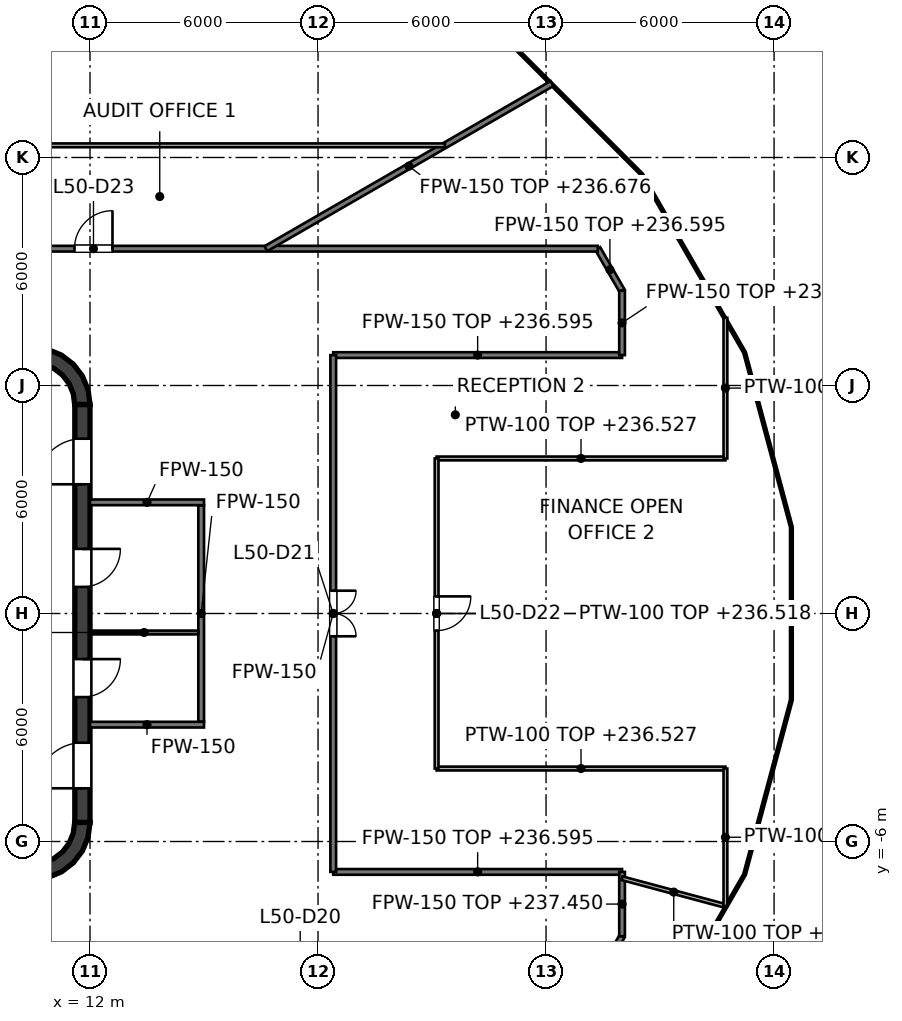
"""IFC4 building model, lengths in metres.
Left out: names, types, materials, properties, quantities, classifications, styles, units other than length and angle.
Written with IfcOpenShell. Run it as: python <this file> out.ifc"""

import sys

from ifc_helpers import new_model, si_unit, direction, frame, frame_2d, origin, place, context, subcontext, project, spatial, polyline, rectangle, outline, extrude, element, fill, save


model = new_model("IFC4")
c1 = context("Model", 3, precision=1e-05, world=origin(), true_north=direction((0.0, 1.0)))
c2 = subcontext(c1, "Body", "Model", "MODEL_VIEW")
j1 = project(units=[si_unit("LENGTHUNIT", "METRE"), si_unit("PLANEANGLEUNIT", "RADIAN")], contexts=[c1])
p1 = place(None, origin())
s1 = spatial("IfcSite", under=j1, at=p1, CompositionType="ELEMENT")
p2 = place(p1, origin())
s2 = spatial("IfcBuilding", under=s1, at=p2, CompositionType="ELEMENT")
p3 = place(p2, frame((0.0, 0.0, 233.6)))
s3 = spatial("IfcBuildingStorey", under=s2, at=p3, CompositionType="ELEMENT", Elevation=233.6)
p4 = place(p3, frame((11.8, -5.5, 0.0), z_axis=(0.0, 0.0, 1.0), x_axis=(0.0, 1.0, 0.0)))
e1 = element("IfcWall", 1, at=p4, inside=s3, PredefinedType="SHEAR", context=c2, shape_type="SweptSolid", body=[
    extrude(rectangle(XDim=11.0, YDim=0.4, at=frame_2d((5.5, 0.0))), origin(), (0.0, 0.0, 1.0), 4.0),
])
p5 = place(p4, frame((3.3, 0.0, 0.0)))
e2 = element("IfcOpeningElement", 2, at=p5, cuts=e1, PredefinedType="OPENING", context=c2, shape_type="SweptSolid", body=[
    extrude(rectangle(XDim=1.0, YDim=2.1, at=frame_2d((0.5, 1.05))), frame((0.0, 0.2, 0.0), z_axis=(0.0, -1.0, 0.0), x_axis=(1.0, 0.0, 0.0)), (0.0, 0.0, 1.0), 0.4),
])
p6 = place(p4, frame((6.2, 0.0, 0.0)))
e3 = element("IfcOpeningElement", 3, at=p6, cuts=e1, PredefinedType="OPENING", context=c2, shape_type="SweptSolid", body=[
    extrude(rectangle(XDim=1.0, YDim=2.1, at=frame_2d((0.5, 1.05))), frame((0.0, 0.2, 0.0), z_axis=(0.0, -1.0, 0.0), x_axis=(1.0, 0.0, 0.0)), (0.0, 0.0, 1.0), 0.4),
])
p7 = place(p4, frame((0.9, 0.0, 0.0)))
e4 = element("IfcOpeningElement", 4, at=p7, cuts=e1, PredefinedType="OPENING", context=c2, shape_type="SweptSolid", body=[
    extrude(rectangle(XDim=1.2, YDim=2.1, at=frame_2d((0.6, 1.05))), frame((0.0, 0.2, 0.0), z_axis=(0.0, -1.0, 0.0), x_axis=(1.0, 0.0, 0.0)), (0.0, 0.0, 1.0), 0.4),
])
p8 = place(p4, frame((8.9, 0.0, 0.0)))
e5 = element("IfcOpeningElement", 5, at=p8, cuts=e1, PredefinedType="OPENING", context=c2, shape_type="SweptSolid", body=[
    extrude(rectangle(XDim=1.2, YDim=2.1, at=frame_2d((0.6, 1.05))), frame((0.0, 0.2, 0.0), z_axis=(0.0, -1.0, 0.0), x_axis=(1.0, 0.0, 0.0)), (0.0, 0.0, 1.0), 0.4),
])
p9 = place(p3, origin())
e6 = element("IfcWall", 6, at=p9, inside=s3, PredefinedType="SHEAR", context=c2, shape_type="SweptSolid", body=[
    extrude(outline(polyline([(10.5, 7.0), (10.5, 6.596), (10.784, 6.559), (11.048, 6.45), (11.275, 6.275), (11.45, 6.048), (11.559, 5.784), (11.596, 5.5), (12.0, 5.5), (11.949, 5.888), (11.799, 6.25), (11.561, 6.561), (11.25, 6.799), (10.888, 6.949), (10.5, 7.0)])), origin(), (0.0, 0.0, 1.0), 4.0),
])
e7 = element("IfcWall", 7, at=p9, inside=s3, PredefinedType="SHEAR", context=c2, shape_type="SweptSolid", body=[
    extrude(outline(polyline([(12.0, -5.5), (11.596, -5.5), (11.559, -5.784), (11.45, -6.048), (11.275, -6.275), (11.048, -6.45), (10.784, -6.559), (10.5, -6.596), (10.5, -7.0), (10.888, -6.949), (11.25, -6.799), (11.561, -6.561), (11.799, -6.25), (11.949, -5.888), (12.0, -5.5)])), origin(), (0.0, 0.0, 1.0), 4.0),
])
p10 = place(p3, frame((14.925, -2.85, 0.0), z_axis=(0.0, 0.0, 1.0), x_axis=(0.0, 1.0, 0.0)))
e8 = element("IfcWall", 8, at=p10, inside=s3, PredefinedType="PARTITIONING", context=c2, shape_type="SweptSolid", body=[
    extrude(rectangle(XDim=5.7, YDim=0.15, at=frame_2d((2.85, 0.0))), origin(), (0.0, 0.0, 1.0), 2.918),
])
for number, where, z_axis, x_axis in (
    (9, (12.0, 2.925, 0.0), (0.0, 0.0, 1.0), (1.0, 0.0, 0.0)),
    (10, (12.0, -2.925, 0.0), (0.0, 0.0, 1.0), (1.0, 0.0, 0.0)),
):
    element("IfcWall", number, at=place(p3, frame(where, z_axis=z_axis, x_axis=x_axis)), inside=s3, PredefinedType="PARTITIONING", context=c2, shape_type="SweptSolid", body=[
        extrude(rectangle(XDim=3.0, YDim=0.15, at=frame_2d((1.5, 0.0))), origin(), (0.0, 0.0, 1.0), 2.918),
    ])
p11 = place(p3, frame((12.0, -0.5, 0.0), z_axis=(0.0, 0.0, 1.0), x_axis=(1.0, 0.0, 0.0)))
e11 = element("IfcWall", 11, at=p11, inside=s3, PredefinedType="PARTITIONING", context=c2, shape_type="SweptSolid", body=[
    extrude(rectangle(XDim=2.85, YDim=0.1, at=frame_2d((1.425, 0.0))), origin(), (0.0, 0.0, 1.0), 3.85),
])
p12 = place(p3, frame((25.361, 9.6, 0.0), z_axis=(0.0, 0.0, 1.0), x_axis=(0.499816142895, -0.866131527715, 0.0)))
e12 = element("IfcWall", 12, at=p12, inside=s3, PredefinedType="PARTITIONING", context=c2, shape_type="SweptSolid", body=[
    extrude(rectangle(XDim=1.278, YDim=0.15, at=frame_2d((0.639, 0.0))), origin(), (0.0, 0.0, 1.0), 2.995),
])
for number, where, z_axis, x_axis in (
    (13, (18.4, -6.8, 0.0), (0.0, 0.0, 1.0), (1.0, 0.0, 0.0)),
    (14, (18.4, 6.8, 0.0), (0.0, 0.0, 1.0), (1.0, 0.0, 0.0)),
):
    element("IfcWall", number, at=place(p3, frame(where, z_axis=z_axis, x_axis=x_axis)), inside=s3, PredefinedType="PARTITIONING", context=c2, shape_type="SweptSolid", body=[
        extrude(rectangle(XDim=7.6, YDim=0.15, at=frame_2d((3.8, 0.0))), origin(), (0.0, 0.0, 1.0), 2.995),
    ])
p13 = place(p3, frame((-25.36, 9.6, 0.0), z_axis=(0.0, 0.0, 1.0), x_axis=(1.0, 0.0, 0.0)))
e15 = element("IfcWall", 15, at=p13, inside=s3, PredefinedType="PARTITIONING", context=c2, shape_type="SweptSolid", body=[
    extrude(rectangle(XDim=50.721, YDim=0.15, at=frame_2d((25.361, 0.0))), origin(), (0.0, 0.0, 1.0), 2.927),
])
p14 = place(p13, frame((36.951, 0.0, 0.0)))
e16 = element("IfcOpeningElement", 16, at=p14, cuts=e15, PredefinedType="OPENING", context=c2, shape_type="SweptSolid", body=[
    extrude(rectangle(XDim=1.0, YDim=2.1, at=frame_2d((0.5, 1.05))), frame((0.0, 0.075, 0.0), z_axis=(0.0, -1.0, 0.0), x_axis=(1.0, 0.0, 0.0)), (0.0, 0.0, 1.0), 0.15),
])
p15 = place(p13, frame((30.168, 0.0, 0.0)))
e17 = element("IfcOpeningElement", 17, at=p15, cuts=e15, PredefinedType="OPENING", context=c2, shape_type="SweptSolid", body=[
    extrude(rectangle(XDim=1.0, YDim=2.1, at=frame_2d((0.5, 1.05))), frame((0.0, 0.075, 0.0), z_axis=(0.0, -1.0, 0.0), x_axis=(1.0, 0.0, 0.0)), (0.0, 0.0, 1.0), 0.15),
])
p16 = place(p13, frame((25.004, 0.0, 0.0)))
e18 = element("IfcOpeningElement", 18, at=p16, cuts=e15, PredefinedType="OPENING", context=c2, shape_type="SweptSolid", body=[
    extrude(rectangle(XDim=1.0, YDim=2.1, at=frame_2d((0.5, 1.05))), frame((0.0, 0.075, 0.0), z_axis=(0.0, -1.0, 0.0), x_axis=(1.0, 0.0, 0.0)), (0.0, 0.0, 1.0), 0.15),
])
p17 = place(p13, frame((18.774, 0.0, 0.0)))
e19 = element("IfcOpeningElement", 19, at=p17, cuts=e15, PredefinedType="OPENING", context=c2, shape_type="SweptSolid", body=[
    extrude(rectangle(XDim=1.0, YDim=2.1, at=frame_2d((0.5, 1.05))), frame((0.0, 0.075, 0.0), z_axis=(0.0, -1.0, 0.0), x_axis=(1.0, 0.0, 0.0)), (0.0, 0.0, 1.0), 0.15),
])
p18 = place(p13, frame((7.23, 0.0, 0.0)))
e20 = element("IfcOpeningElement", 20, at=p18, cuts=e15, PredefinedType="OPENING", context=c2, shape_type="SweptSolid", body=[
    extrude(rectangle(XDim=1.2, YDim=2.1, at=frame_2d((0.6, 1.05))), frame((0.0, 0.075, 0.0), z_axis=(0.0, -1.0, 0.0), x_axis=(1.0, 0.0, 0.0)), (0.0, 0.0, 1.0), 0.15),
])
p19 = place(p3, frame((16.628, 9.6, 0.0), z_axis=(0.0, 0.0, 1.0), x_axis=(0.866056969008, 0.499945323442, 0.0)))
e21 = element("IfcWall", 21, at=p19, inside=s3, PredefinedType="PARTITIONING", context=c2, shape_type="SweptSolid", body=[
    extrude(rectangle(XDim=8.692, YDim=0.15, at=frame_2d((4.346, 0.0))), origin(), (0.0, 0.0, 1.0), 3.076),
])
p20 = place(p3, frame((25.361, -9.6, 0.0), z_axis=(0.0, 0.0, 1.0), x_axis=(0.499816142895, 0.866131527715, 0.0)))
e22 = element("IfcWall", 22, at=p20, inside=s3, PredefinedType="PARTITIONING", context=c2, shape_type="SweptSolid", body=[
    extrude(rectangle(XDim=1.278, YDim=0.15, at=frame_2d((0.639, 0.0))), origin(), (0.0, 0.0, 1.0), 2.995),
])
for number, where, z_axis, x_axis in (
    (23, (26.0, -8.493, 0.0), (0.0, 0.0, 1.0), (0.0, 1.0, 0.0)),
    (24, (26.0, 6.8, 0.0), (0.0, 0.0, 1.0), (0.0, 1.0, 0.0)),
):
    element("IfcWall", number, at=place(p3, frame(where, z_axis=z_axis, x_axis=x_axis)), inside=s3, PredefinedType="PARTITIONING", context=c2, shape_type="SweptSolid", body=[
        extrude(rectangle(XDim=1.693, YDim=0.15, at=frame_2d((0.846, 0.0))), origin(), (0.0, 0.0, 1.0), 3.85),
    ])
p21 = place(p3, frame((18.4, -6.8, 0.0), z_axis=(0.0, 0.0, 1.0), x_axis=(0.0, 1.0, 0.0)))
e25 = element("IfcWall", 25, at=p21, inside=s3, PredefinedType="PARTITIONING", context=c2, shape_type="SweptSolid", body=[
    extrude(rectangle(XDim=13.6, YDim=0.15, at=frame_2d((6.8, 0.0))), origin(), (0.0, 0.0, 1.0), 2.918),
])
p22 = place(p21, frame((6.2, 0.0, 0.0)))
e26 = element("IfcOpeningElement", 26, at=p22, cuts=e25, PredefinedType="OPENING", context=c2, shape_type="SweptSolid", body=[
    extrude(rectangle(XDim=1.2, YDim=2.1, at=frame_2d((0.6, 1.05))), frame((0.0, 0.075, 0.0), z_axis=(0.0, -1.0, 0.0), x_axis=(1.0, 0.0, 0.0)), (0.0, 0.0, 1.0), 0.15),
])
p23 = place(p3, frame((26.0, -6.967, 0.0), z_axis=(0.0, 0.0, 1.0), x_axis=(0.965908960342, -0.258881981472, 0.0)))
e27 = element("IfcWall", 27, at=p23, inside=s3, PredefinedType="PARTITIONING", context=c2, shape_type="SweptSolid", body=[
    extrude(rectangle(XDim=2.816, YDim=0.1, at=frame_2d((1.408, 0.0))), origin(), (0.0, 0.0, 1.0), 3.527),
])
for number, where, z_axis, x_axis in (
    (28, (21.12, -4.08, 0.0), (0.0, 0.0, 1.0), (1.0, 0.0, 0.0)),
    (29, (21.12, 4.08, 0.0), (0.0, 0.0, 1.0), (1.0, 0.0, 0.0)),
):
    element("IfcWall", number, at=place(p3, frame(where, z_axis=z_axis, x_axis=x_axis)), inside=s3, PredefinedType="PARTITIONING", context=c2, shape_type="SweptSolid", body=[
        extrude(rectangle(XDim=7.6, YDim=0.1, at=frame_2d((3.8, 0.0))), origin(), (0.0, 0.0, 1.0), 2.927),
    ])
p24 = place(p3, frame((-25.781, 12.32, 0.0), z_axis=(0.0, 0.0, 1.0), x_axis=(1.0, 0.0, 0.0)))
e30 = element("IfcWall", 30, at=p24, inside=s3, PredefinedType="PARTITIONING", context=c2, shape_type="SweptSolid", body=[
    extrude(rectangle(XDim=47.12, YDim=0.1, at=frame_2d((23.56, 0.0))), origin(), (0.0, 0.0, 1.0), 2.927),
])
p25 = place(p24, frame((25.081, 0.0, 0.0)))
e31 = element("IfcOpeningElement", 31, at=p25, cuts=e30, PredefinedType="OPENING", context=c2, shape_type="SweptSolid", body=[
    extrude(rectangle(XDim=1.8, YDim=2.1, at=frame_2d((0.9, 1.05))), frame((0.0, 0.05, 0.0), z_axis=(0.0, -1.0, 0.0), x_axis=(1.0, 0.0, 0.0)), (0.0, 0.0, 1.0), 0.1),
])
p26 = place(p24, frame((5.831, 0.0, 0.0)))
e32 = element("IfcOpeningElement", 32, at=p26, cuts=e30, PredefinedType="OPENING", context=c2, shape_type="SweptSolid", body=[
    extrude(rectangle(XDim=1.8, YDim=2.1, at=frame_2d((0.9, 1.05))), frame((0.0, 0.05, 0.0), z_axis=(0.0, -1.0, 0.0), x_axis=(1.0, 0.0, 0.0)), (0.0, 0.0, 1.0), 0.1),
])
p27 = place(p3, frame((28.72, -7.696, 0.0), z_axis=(0.0, 0.0, 1.0), x_axis=(0.0, 1.0, 0.0)))
e33 = element("IfcWall", 33, at=p27, inside=s3, PredefinedType="PARTITIONING", context=c2, shape_type="SweptSolid", body=[
    extrude(rectangle(XDim=3.616, YDim=0.1, at=frame_2d((1.808, 0.0))), origin(), (0.0, 0.0, 1.0), 2.918),
])
p28 = place(p3, frame((28.72, 4.08, 0.0), z_axis=(0.0, 0.0, 1.0), x_axis=(0.0, 1.0, 0.0)))
e34 = element("IfcWall", 34, at=p28, inside=s3, PredefinedType="PARTITIONING", context=c2, shape_type="SweptSolid", body=[
    extrude(rectangle(XDim=3.702, YDim=0.1, at=frame_2d((1.851, 0.0))), origin(), (0.0, 0.0, 1.0), 2.918),
])
p29 = place(p3, frame((21.12, -4.08, 0.0), z_axis=(0.0, 0.0, 1.0), x_axis=(0.0, 1.0, 0.0)))
e35 = element("IfcWall", 35, at=p29, inside=s3, PredefinedType="PARTITIONING", context=c2, shape_type="SweptSolid", body=[
    extrude(rectangle(XDim=8.16, YDim=0.1, at=frame_2d((4.08, 0.0))), origin(), (0.0, 0.0, 1.0), 2.918),
])
p30 = place(p29, frame((3.63, 0.0, 0.0)))
e36 = element("IfcOpeningElement", 36, at=p30, cuts=e35, PredefinedType="OPENING", context=c2, shape_type="SweptSolid", body=[
    extrude(rectangle(XDim=0.9, YDim=2.1, at=frame_2d((0.45, 1.05))), frame((0.0, 0.05, 0.0), z_axis=(0.0, -1.0, 0.0), x_axis=(1.0, 0.0, 0.0)), (0.0, 0.0, 1.0), 0.1),
])
p31 = place(p5, origin())
e37 = element("IfcDoor", 37, at=p31, inside=s3, OperationType="SINGLE_SWING_RIGHT", PredefinedType="DOOR", context=c2, shape_type="SweptSolid", body=[
    extrude(rectangle(XDim=1.0, YDim=2.1, at=frame_2d((0.5, 1.05))), frame((0.0, 0.025, 0.0), z_axis=(0.0, -1.0, 0.0), x_axis=(1.0, 0.0, 0.0)), (0.0, 0.0, 1.0), 0.05),
])
fill(e2, e37)
p32 = place(p6, origin())
e38 = element("IfcDoor", 38, at=p32, inside=s3, OperationType="SINGLE_SWING_RIGHT", PredefinedType="DOOR", context=c2, shape_type="SweptSolid", body=[
    extrude(rectangle(XDim=1.0, YDim=2.1, at=frame_2d((0.5, 1.05))), frame((0.0, 0.025, 0.0), z_axis=(0.0, -1.0, 0.0), x_axis=(1.0, 0.0, 0.0)), (0.0, 0.0, 1.0), 0.05),
])
fill(e3, e38)
p33 = place(p7, origin())
e39 = element("IfcDoor", 39, at=p33, inside=s3, OperationType="SINGLE_SWING_LEFT", PredefinedType="DOOR", context=c2, shape_type="SweptSolid", body=[
    extrude(rectangle(XDim=1.2, YDim=2.1, at=frame_2d((0.6, 1.05))), frame((0.0, 0.025, 0.0), z_axis=(0.0, -1.0, 0.0), x_axis=(1.0, 0.0, 0.0)), (0.0, 0.0, 1.0), 0.05),
])
fill(e4, e39)
p34 = place(p8, origin())
e40 = element("IfcDoor", 40, at=p34, inside=s3, OperationType="SINGLE_SWING_LEFT", PredefinedType="DOOR", context=c2, shape_type="SweptSolid", body=[
    extrude(rectangle(XDim=1.2, YDim=2.1, at=frame_2d((0.6, 1.05))), frame((0.0, 0.025, 0.0), z_axis=(0.0, -1.0, 0.0), x_axis=(1.0, 0.0, 0.0)), (0.0, 0.0, 1.0), 0.05),
])
fill(e5, e40)
p35 = place(p22, origin())
e41 = element("IfcDoor", 41, at=p35, inside=s3, OperationType="DOUBLE_DOOR_SINGLE_SWING", PredefinedType="DOOR", context=c2, shape_type="SweptSolid", body=[
    extrude(rectangle(XDim=1.2, YDim=2.1, at=frame_2d((0.6, 1.05))), frame((0.0, 0.025, 0.0), z_axis=(0.0, -1.0, 0.0), x_axis=(1.0, 0.0, 0.0)), (0.0, 0.0, 1.0), 0.05),
])
fill(e26, e41)
p36 = place(p30, origin())
e42 = element("IfcDoor", 42, at=p36, inside=s3, OperationType="SINGLE_SWING_RIGHT", PredefinedType="DOOR", context=c2, shape_type="SweptSolid", body=[
    extrude(rectangle(XDim=0.9, YDim=2.1, at=frame_2d((0.45, 1.05))), frame((0.0, 0.025, 0.0), z_axis=(0.0, -1.0, 0.0), x_axis=(1.0, 0.0, 0.0)), (0.0, 0.0, 1.0), 0.05),
])
fill(e36, e42)
p37 = place(p14, origin())
e43 = element("IfcDoor", 43, at=p37, inside=s3, OperationType="SINGLE_SWING_RIGHT", PredefinedType="DOOR", context=c2, shape_type="SweptSolid", body=[
    extrude(rectangle(XDim=1.0, YDim=2.1, at=frame_2d((0.5, 1.05))), frame((0.0, 0.025, 0.0), z_axis=(0.0, -1.0, 0.0), x_axis=(1.0, 0.0, 0.0)), (0.0, 0.0, 1.0), 0.05),
])
fill(e16, e43)
save(model, sys.argv[1])
